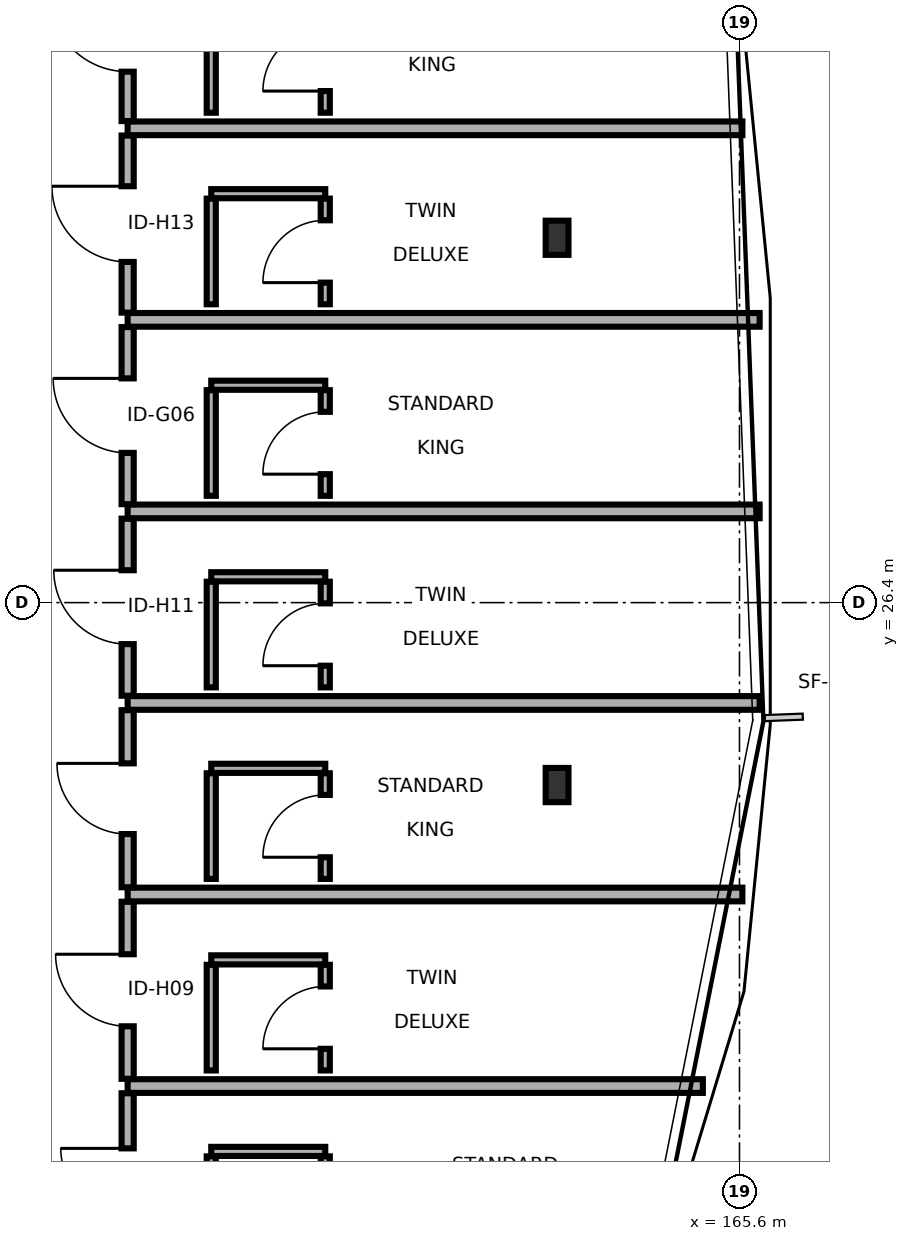
"""IFC4 building model, lengths in metres.
Left out: names, types, materials, properties, quantities, classifications, styles, units other than length and angle.
Written with IfcOpenShell. Run it as: python <this file> out.ifc"""

import sys

from ifc_helpers import new_model, si_unit, direction, frame, frame_2d, origin, origin_2d, place, context, subcontext, project, spatial, rectangle, i_section, extrude, element, fill, save


model = new_model("IFC4")
c1 = context("Model", 3, precision=1e-05, world=origin(), true_north=direction((0.0, 1.0)))
c2 = subcontext(c1, "Body", "Model", "MODEL_VIEW")
j1 = project(units=[si_unit("LENGTHUNIT", "METRE"), si_unit("PLANEANGLEUNIT", "RADIAN")], contexts=[c1])
p1 = place(None, origin())
s1 = spatial("IfcSite", under=j1, at=p1, CompositionType="ELEMENT")
p2 = place(p1, origin())
s2 = spatial("IfcBuilding", under=s1, at=p2, CompositionType="ELEMENT")
p3 = place(p2, frame((0.0, 0.0, 31.7)))
s3 = spatial("IfcBuildingStorey", under=s2, at=p3, CompositionType="ELEMENT", Elevation=31.7)
for number, where, z_axis, x_axis in (
    (1, (163.2, 24.0, 0.0), (0.0, 0.0, 1.0), (1.0, 0.0, 0.0)),
    (2, (163.2, 31.2, 0.0), (0.0, 0.0, 1.0), (1.0, 0.0, 0.0)),
):
    element("IfcColumn", number, at=place(p3, frame(where, z_axis=z_axis, x_axis=x_axis)), inside=s3, PredefinedType="COLUMN", context=c2, shape_type="SweptSolid", body=[
        extrude(i_section(OverallWidth=0.3, OverallDepth=0.45, WebThickness=0.014, FlangeThickness=0.026, FilletRadius=0.027, at=origin_2d()), origin(), (0.0, 0.0, 1.0), 3.4),
    ])
p4 = place(p3, frame((157.55, 17.615, 0.0), z_axis=(0.0, 0.0, 1.0), x_axis=(0.0, 1.0, 0.0)))
e3 = element("IfcWall", 3, at=p4, inside=s3, PredefinedType="PARTITIONING", context=c2, shape_type="SweptSolid", body=[
    extrude(rectangle(XDim=2.33, YDim=0.16, at=frame_2d((1.165, 0.0))), origin(), (0.0, 0.0, 1.0), 3.17),
])
p5 = place(p4, frame((0.725, 0.0, 0.0)))
e4 = element("IfcOpeningElement", 4, at=p5, cuts=e3, PredefinedType="OPENING", context=c2, shape_type="SweptSolid", body=[
    extrude(rectangle(XDim=0.88, YDim=2.05, at=frame_2d((0.44, 1.025))), frame((0.0, 0.09, 0.0), z_axis=(0.0, -1.0, 0.0), x_axis=(1.0, 0.0, 0.0)), (0.0, 0.0, 1.0), 0.18),
])
p6 = place(p3, frame((158.65, 19.18, 0.0), z_axis=(0.0, 0.0, 1.0), x_axis=(1.0, 0.0, 0.0)))
e5 = element("IfcWall", 5, at=p6, inside=s3, PredefinedType="PARTITIONING", context=c2, shape_type="SweptSolid", body=[
    extrude(rectangle(XDim=1.5, YDim=0.12, at=frame_2d((0.75, 0.0))), origin(), (0.0, 0.0, 1.0), 3.17),
])
p7 = place(p3, frame((158.65, 17.725, 0.0), z_axis=(0.0, 0.0, 1.0), x_axis=(0.0, 1.0, 0.0)))
e6 = element("IfcWall", 6, at=p7, inside=s3, PredefinedType="PARTITIONING", context=c2, shape_type="SweptSolid", body=[
    extrude(rectangle(XDim=1.39, YDim=0.12, at=frame_2d((0.695, 0.0))), origin(), (0.0, 0.0, 1.0), 3.17),
])
p8 = place(p3, frame((160.15, 17.725, 0.0), z_axis=(0.0, 0.0, 1.0), x_axis=(0.0, 1.0, 0.0)))
e7 = element("IfcWall", 7, at=p8, inside=s3, PredefinedType="PARTITIONING", context=c2, shape_type="SweptSolid", body=[
    extrude(rectangle(XDim=1.39, YDim=0.12, at=frame_2d((0.695, 0.0))), origin(), (0.0, 0.0, 1.0), 3.17),
])
p9 = place(p8, frame((0.285, 0.0, 0.0)))
e8 = element("IfcOpeningElement", 8, at=p9, cuts=e7, PredefinedType="OPENING", context=c2, shape_type="SweptSolid", body=[
    extrude(rectangle(XDim=0.82, YDim=2.08, at=frame_2d((0.41, 1.04))), frame((0.0, 0.07, 0.0), z_axis=(0.0, -1.0, 0.0), x_axis=(1.0, 0.0, 0.0)), (0.0, 0.0, 1.0), 0.14),
])
p10 = place(p3, frame((157.55, 20.04, 0.0), z_axis=(0.0, 0.0, 1.0), x_axis=(1.0, 0.0, 0.0)))
e9 = element("IfcWall", 9, at=p10, inside=s3, PredefinedType="PARTITIONING", context=c2, shape_type="SweptSolid", body=[
    extrude(rectangle(XDim=7.568, YDim=0.18, at=frame_2d((3.784, 0.0))), origin(), (0.0, 0.0, 1.0), 2.655),
])
p11 = place(p3, frame((157.55, 20.135, 0.0), z_axis=(0.0, 0.0, 1.0), x_axis=(0.0, 1.0, 0.0)))
e10 = element("IfcWall", 10, at=p11, inside=s3, PredefinedType="PARTITIONING", context=c2, shape_type="SweptSolid", body=[
    extrude(rectangle(XDim=2.33, YDim=0.16, at=frame_2d((1.165, 0.0))), origin(), (0.0, 0.0, 1.0), 3.17),
])
p12 = place(p11, frame((0.691, 0.0, 0.0)))
e11 = element("IfcOpeningElement", 11, at=p12, cuts=e10, PredefinedType="OPENING", context=c2, shape_type="SweptSolid", body=[
    extrude(rectangle(XDim=0.948, YDim=2.1, at=frame_2d((0.474, 1.05))), frame((0.0, 0.09, 0.0), z_axis=(0.0, -1.0, 0.0), x_axis=(1.0, 0.0, 0.0)), (0.0, 0.0, 1.0), 0.18),
])
p13 = place(p3, frame((158.65, 21.7, 0.0), z_axis=(0.0, 0.0, 1.0), x_axis=(1.0, 0.0, 0.0)))
e12 = element("IfcWall", 12, at=p13, inside=s3, PredefinedType="PARTITIONING", context=c2, shape_type="SweptSolid", body=[
    extrude(rectangle(XDim=1.5, YDim=0.12, at=frame_2d((0.75, 0.0))), origin(), (0.0, 0.0, 1.0), 3.17),
])
p14 = place(p3, frame((158.65, 20.245, 0.0), z_axis=(0.0, 0.0, 1.0), x_axis=(0.0, 1.0, 0.0)))
e13 = element("IfcWall", 13, at=p14, inside=s3, PredefinedType="PARTITIONING", context=c2, shape_type="SweptSolid", body=[
    extrude(rectangle(XDim=1.39, YDim=0.12, at=frame_2d((0.695, 0.0))), origin(), (0.0, 0.0, 1.0), 3.17),
])
p15 = place(p3, frame((160.15, 20.245, 0.0), z_axis=(0.0, 0.0, 1.0), x_axis=(0.0, 1.0, 0.0)))
e14 = element("IfcWall", 14, at=p15, inside=s3, PredefinedType="PARTITIONING", context=c2, shape_type="SweptSolid", body=[
    extrude(rectangle(XDim=1.39, YDim=0.12, at=frame_2d((0.695, 0.0))), origin(), (0.0, 0.0, 1.0), 3.17),
])
p16 = place(p15, frame((0.285, 0.0, 0.0)))
e15 = element("IfcOpeningElement", 15, at=p16, cuts=e14, PredefinedType="OPENING", context=c2, shape_type="SweptSolid", body=[
    extrude(rectangle(XDim=0.82, YDim=2.08, at=frame_2d((0.41, 1.04))), frame((0.0, 0.07, 0.0), z_axis=(0.0, -1.0, 0.0), x_axis=(1.0, 0.0, 0.0)), (0.0, 0.0, 1.0), 0.14),
])
p17 = place(p3, frame((157.55, 22.56, 0.0), z_axis=(0.0, 0.0, 1.0), x_axis=(1.0, 0.0, 0.0)))
e16 = element("IfcWall", 16, at=p17, inside=s3, PredefinedType="PARTITIONING", context=c2, shape_type="SweptSolid", body=[
    extrude(rectangle(XDim=8.088, YDim=0.18, at=frame_2d((4.044, 0.0))), origin(), (0.0, 0.0, 1.0), 2.655),
])
p18 = place(p3, frame((157.55, 22.655, 0.0), z_axis=(0.0, 0.0, 1.0), x_axis=(0.0, 1.0, 0.0)))
e17 = element("IfcWall", 17, at=p18, inside=s3, PredefinedType="PARTITIONING", context=c2, shape_type="SweptSolid", body=[
    extrude(rectangle(XDim=2.33, YDim=0.16, at=frame_2d((1.165, 0.0))), origin(), (0.0, 0.0, 1.0), 2.755),
])
p19 = place(p18, frame((0.7, 0.0, 0.0)))
e18 = element("IfcOpeningElement", 18, at=p19, cuts=e17, PredefinedType="OPENING", context=c2, shape_type="SweptSolid", body=[
    extrude(rectangle(XDim=0.93, YDim=2.05, at=frame_2d((0.465, 1.025))), frame((0.0, 0.09, 0.0), z_axis=(0.0, -1.0, 0.0), x_axis=(1.0, 0.0, 0.0)), (0.0, 0.0, 1.0), 0.18),
])
p20 = place(p3, frame((158.65, 24.22, 0.0), z_axis=(0.0, 0.0, 1.0), x_axis=(1.0, 0.0, 0.0)))
e19 = element("IfcWall", 19, at=p20, inside=s3, PredefinedType="PARTITIONING", context=c2, shape_type="SweptSolid", body=[
    extrude(rectangle(XDim=1.5, YDim=0.12, at=frame_2d((0.75, 0.0))), origin(), (0.0, 0.0, 1.0), 2.755),
])
p21 = place(p3, frame((158.65, 22.765, 0.0), z_axis=(0.0, 0.0, 1.0), x_axis=(0.0, 1.0, 0.0)))
e20 = element("IfcWall", 20, at=p21, inside=s3, PredefinedType="PARTITIONING", context=c2, shape_type="SweptSolid", body=[
    extrude(rectangle(XDim=1.39, YDim=0.12, at=frame_2d((0.695, 0.0))), origin(), (0.0, 0.0, 1.0), 2.755),
])
p22 = place(p3, frame((160.15, 22.765, 0.0), z_axis=(0.0, 0.0, 1.0), x_axis=(0.0, 1.0, 0.0)))
e21 = element("IfcWall", 21, at=p22, inside=s3, PredefinedType="PARTITIONING", context=c2, shape_type="SweptSolid", body=[
    extrude(rectangle(XDim=1.39, YDim=0.12, at=frame_2d((0.695, 0.0))), origin(), (0.0, 0.0, 1.0), 2.755),
])
p23 = place(p22, frame((0.285, 0.0, 0.0)))
e22 = element("IfcOpeningElement", 22, at=p23, cuts=e21, PredefinedType="OPENING", context=c2, shape_type="SweptSolid", body=[
    extrude(rectangle(XDim=0.82, YDim=2.08, at=frame_2d((0.41, 1.04))), frame((0.0, 0.07, 0.0), z_axis=(0.0, -1.0, 0.0), x_axis=(1.0, 0.0, 0.0)), (0.0, 0.0, 1.0), 0.14),
])
p24 = place(p3, frame((157.55, 25.08, 0.0), z_axis=(0.0, 0.0, 1.0), x_axis=(1.0, 0.0, 0.0)))
e23 = element("IfcWall", 23, at=p24, inside=s3, PredefinedType="PARTITIONING", context=c2, shape_type="SweptSolid", body=[
    extrude(rectangle(XDim=8.315, YDim=0.18, at=frame_2d((4.157, 0.0))), origin(), (0.0, 0.0, 1.0), 2.655),
])
p25 = place(p3, frame((157.55, 25.175, 0.0), z_axis=(0.0, 0.0, 1.0), x_axis=(0.0, 1.0, 0.0)))
e24 = element("IfcWall", 24, at=p25, inside=s3, PredefinedType="PARTITIONING", context=c2, shape_type="SweptSolid", body=[
    extrude(rectangle(XDim=2.33, YDim=0.16, at=frame_2d((1.165, 0.0))), origin(), (0.0, 0.0, 1.0), 3.17),
])
p26 = place(p25, frame((0.679, 0.0, 0.0)))
e25 = element("IfcOpeningElement", 25, at=p26, cuts=e24, PredefinedType="OPENING", context=c2, shape_type="SweptSolid", body=[
    extrude(rectangle(XDim=0.972, YDim=2.16, at=frame_2d((0.486, 1.08))), frame((0.0, 0.09, 0.0), z_axis=(0.0, -1.0, 0.0), x_axis=(1.0, 0.0, 0.0)), (0.0, 0.0, 1.0), 0.18),
])
p27 = place(p3, frame((158.65, 26.74, 0.0), z_axis=(0.0, 0.0, 1.0), x_axis=(1.0, 0.0, 0.0)))
e26 = element("IfcWall", 26, at=p27, inside=s3, PredefinedType="PARTITIONING", context=c2, shape_type="SweptSolid", body=[
    extrude(rectangle(XDim=1.5, YDim=0.12, at=frame_2d((0.75, 0.0))), origin(), (0.0, 0.0, 1.0), 3.17),
])
p28 = place(p3, frame((158.65, 25.285, 0.0), z_axis=(0.0, 0.0, 1.0), x_axis=(0.0, 1.0, 0.0)))
e27 = element("IfcWall", 27, at=p28, inside=s3, PredefinedType="PARTITIONING", context=c2, shape_type="SweptSolid", body=[
    extrude(rectangle(XDim=1.39, YDim=0.12, at=frame_2d((0.695, 0.0))), origin(), (0.0, 0.0, 1.0), 3.17),
])
p29 = place(p3, frame((160.15, 25.285, 0.0), z_axis=(0.0, 0.0, 1.0), x_axis=(0.0, 1.0, 0.0)))
e28 = element("IfcWall", 28, at=p29, inside=s3, PredefinedType="PARTITIONING", context=c2, shape_type="SweptSolid", body=[
    extrude(rectangle(XDim=1.39, YDim=0.12, at=frame_2d((0.695, 0.0))), origin(), (0.0, 0.0, 1.0), 3.17),
])
p30 = place(p29, frame((0.285, 0.0, 0.0)))
e29 = element("IfcOpeningElement", 29, at=p30, cuts=e28, PredefinedType="OPENING", context=c2, shape_type="SweptSolid", body=[
    extrude(rectangle(XDim=0.82, YDim=2.08, at=frame_2d((0.41, 1.04))), frame((0.0, 0.07, 0.0), z_axis=(0.0, -1.0, 0.0), x_axis=(1.0, 0.0, 0.0)), (0.0, 0.0, 1.0), 0.14),
])
p31 = place(p3, frame((157.55, 27.6, 0.0), z_axis=(0.0, 0.0, 1.0), x_axis=(1.0, 0.0, 0.0)))
e30 = element("IfcWall", 30, at=p31, inside=s3, PredefinedType="PARTITIONING", context=c2, shape_type="SweptSolid", body=[
    extrude(rectangle(XDim=8.315, YDim=0.18, at=frame_2d((4.157, 0.0))), origin(), (0.0, 0.0, 1.0), 2.655),
])
p32 = place(p3, frame((157.55, 27.695, 0.0), z_axis=(0.0, 0.0, 1.0), x_axis=(0.0, 1.0, 0.0)))
e31 = element("IfcWall", 31, at=p32, inside=s3, PredefinedType="PARTITIONING", context=c2, shape_type="SweptSolid", body=[
    extrude(rectangle(XDim=2.33, YDim=0.16, at=frame_2d((1.165, 0.0))), origin(), (0.0, 0.0, 1.0), 3.17),
])
p33 = place(p32, frame((0.675, 0.0, 0.0)))
e32 = element("IfcOpeningElement", 32, at=p33, cuts=e31, PredefinedType="OPENING", context=c2, shape_type="SweptSolid", body=[
    extrude(rectangle(XDim=0.98, YDim=2.05, at=frame_2d((0.49, 1.025))), frame((0.0, 0.09, 0.0), z_axis=(0.0, -1.0, 0.0), x_axis=(1.0, 0.0, 0.0)), (0.0, 0.0, 1.0), 0.18),
])
p34 = place(p3, frame((158.65, 29.26, 0.0), z_axis=(0.0, 0.0, 1.0), x_axis=(1.0, 0.0, 0.0)))
e33 = element("IfcWall", 33, at=p34, inside=s3, PredefinedType="PARTITIONING", context=c2, shape_type="SweptSolid", body=[
    extrude(rectangle(XDim=1.5, YDim=0.12, at=frame_2d((0.75, 0.0))), origin(), (0.0, 0.0, 1.0), 3.17),
])
p35 = place(p3, frame((158.65, 27.805, 0.0), z_axis=(0.0, 0.0, 1.0), x_axis=(0.0, 1.0, 0.0)))
e34 = element("IfcWall", 34, at=p35, inside=s3, PredefinedType="PARTITIONING", context=c2, shape_type="SweptSolid", body=[
    extrude(rectangle(XDim=1.39, YDim=0.12, at=frame_2d((0.695, 0.0))), origin(), (0.0, 0.0, 1.0), 3.17),
])
p36 = place(p3, frame((160.15, 27.805, 0.0), z_axis=(0.0, 0.0, 1.0), x_axis=(0.0, 1.0, 0.0)))
e35 = element("IfcWall", 35, at=p36, inside=s3, PredefinedType="PARTITIONING", context=c2, shape_type="SweptSolid", body=[
    extrude(rectangle(XDim=1.39, YDim=0.12, at=frame_2d((0.695, 0.0))), origin(), (0.0, 0.0, 1.0), 3.17),
])
p37 = place(p36, frame((0.285, 0.0, 0.0)))
e36 = element("IfcOpeningElement", 36, at=p37, cuts=e35, PredefinedType="OPENING", context=c2, shape_type="SweptSolid", body=[
    extrude(rectangle(XDim=0.82, YDim=2.08, at=frame_2d((0.41, 1.04))), frame((0.0, 0.07, 0.0), z_axis=(0.0, -1.0, 0.0), x_axis=(1.0, 0.0, 0.0)), (0.0, 0.0, 1.0), 0.14),
])
p38 = place(p3, frame((157.55, 30.12, 0.0), z_axis=(0.0, 0.0, 1.0), x_axis=(1.0, 0.0, 0.0)))
e37 = element("IfcWall", 37, at=p38, inside=s3, PredefinedType="PARTITIONING", context=c2, shape_type="SweptSolid", body=[
    extrude(rectangle(XDim=8.315, YDim=0.18, at=frame_2d((4.157, 0.0))), origin(), (0.0, 0.0, 1.0), 2.655),
])
p39 = place(p3, frame((157.55, 30.215, 0.0), z_axis=(0.0, 0.0, 1.0), x_axis=(0.0, 1.0, 0.0)))
e38 = element("IfcWall", 38, at=p39, inside=s3, PredefinedType="PARTITIONING", context=c2, shape_type="SweptSolid", body=[
    extrude(rectangle(XDim=2.33, YDim=0.16, at=frame_2d((1.165, 0.0))), origin(), (0.0, 0.0, 1.0), 2.755),
])
p40 = place(p39, frame((0.667, 0.0, 0.0)))
e39 = element("IfcOpeningElement", 39, at=p40, cuts=e38, PredefinedType="OPENING", context=c2, shape_type="SweptSolid", body=[
    extrude(rectangle(XDim=0.996, YDim=2.1, at=frame_2d((0.498, 1.05))), frame((0.0, 0.09, 0.0), z_axis=(0.0, -1.0, 0.0), x_axis=(1.0, 0.0, 0.0)), (0.0, 0.0, 1.0), 0.18),
])
p41 = place(p3, frame((158.65, 31.78, 0.0), z_axis=(0.0, 0.0, 1.0), x_axis=(1.0, 0.0, 0.0)))
e40 = element("IfcWall", 40, at=p41, inside=s3, PredefinedType="PARTITIONING", context=c2, shape_type="SweptSolid", body=[
    extrude(rectangle(XDim=1.5, YDim=0.12, at=frame_2d((0.75, 0.0))), origin(), (0.0, 0.0, 1.0), 3.17),
])
p42 = place(p3, frame((158.65, 30.325, 0.0), z_axis=(0.0, 0.0, 1.0), x_axis=(0.0, 1.0, 0.0)))
e41 = element("IfcWall", 41, at=p42, inside=s3, PredefinedType="PARTITIONING", context=c2, shape_type="SweptSolid", body=[
    extrude(rectangle(XDim=1.39, YDim=0.12, at=frame_2d((0.695, 0.0))), origin(), (0.0, 0.0, 1.0), 2.755),
])
p43 = place(p3, frame((160.15, 30.325, 0.0), z_axis=(0.0, 0.0, 1.0), x_axis=(0.0, 1.0, 0.0)))
e42 = element("IfcWall", 42, at=p43, inside=s3, PredefinedType="PARTITIONING", context=c2, shape_type="SweptSolid", body=[
    extrude(rectangle(XDim=1.39, YDim=0.12, at=frame_2d((0.695, 0.0))), origin(), (0.0, 0.0, 1.0), 2.755),
])
p44 = place(p43, frame((0.285, 0.0, 0.0)))
e43 = element("IfcOpeningElement", 43, at=p44, cuts=e42, PredefinedType="OPENING", context=c2, shape_type="SweptSolid", body=[
    extrude(rectangle(XDim=0.82, YDim=2.08, at=frame_2d((0.41, 1.04))), frame((0.0, 0.07, 0.0), z_axis=(0.0, -1.0, 0.0), x_axis=(1.0, 0.0, 0.0)), (0.0, 0.0, 1.0), 0.14),
])
p45 = place(p3, frame((157.55, 32.64, 0.0), z_axis=(0.0, 0.0, 1.0), x_axis=(1.0, 0.0, 0.0)))
e44 = element("IfcWall", 44, at=p45, inside=s3, PredefinedType="PARTITIONING", context=c2, shape_type="SweptSolid", body=[
    extrude(rectangle(XDim=8.088, YDim=0.18, at=frame_2d((4.044, 0.0))), origin(), (0.0, 0.0, 1.0), 2.655),
])
p46 = place(p3, frame((157.55, 32.735, 0.0), z_axis=(0.0, 0.0, 1.0), x_axis=(0.0, 1.0, 0.0)))
e45 = element("IfcWall", 45, at=p46, inside=s3, PredefinedType="PARTITIONING", context=c2, shape_type="SweptSolid", body=[
    extrude(rectangle(XDim=2.33, YDim=0.16, at=frame_2d((1.165, 0.0))), origin(), (0.0, 0.0, 1.0), 3.17),
])
p47 = place(p46, frame((0.65, 0.0, 0.0)))
e46 = element("IfcOpeningElement", 46, at=p47, cuts=e45, PredefinedType="OPENING", context=c2, shape_type="SweptSolid", body=[
    extrude(rectangle(XDim=1.03, YDim=2.05, at=frame_2d((0.515, 1.025))), frame((0.0, 0.09, 0.0), z_axis=(0.0, -1.0, 0.0), x_axis=(1.0, 0.0, 0.0)), (0.0, 0.0, 1.0), 0.18),
])
p48 = place(p3, frame((158.65, 32.845, 0.0), z_axis=(0.0, 0.0, 1.0), x_axis=(0.0, 1.0, 0.0)))
e47 = element("IfcWall", 47, at=p48, inside=s3, PredefinedType="PARTITIONING", context=c2, shape_type="SweptSolid", body=[
    extrude(rectangle(XDim=1.39, YDim=0.12, at=frame_2d((0.695, 0.0))), origin(), (0.0, 0.0, 1.0), 3.17),
])
p49 = place(p3, frame((160.15, 32.845, 0.0), z_axis=(0.0, 0.0, 1.0), x_axis=(0.0, 1.0, 0.0)))
e48 = element("IfcWall", 48, at=p49, inside=s3, PredefinedType="PARTITIONING", context=c2, shape_type="SweptSolid", body=[
    extrude(rectangle(XDim=1.39, YDim=0.12, at=frame_2d((0.695, 0.0))), origin(), (0.0, 0.0, 1.0), 3.17),
])
p50 = place(p49, frame((0.285, 0.0, 0.0)))
e49 = element("IfcOpeningElement", 49, at=p50, cuts=e48, PredefinedType="OPENING", context=c2, shape_type="SweptSolid", body=[
    extrude(rectangle(XDim=0.82, YDim=2.08, at=frame_2d((0.41, 1.04))), frame((0.0, 0.07, 0.0), z_axis=(0.0, -1.0, 0.0), x_axis=(1.0, 0.0, 0.0)), (0.0, 0.0, 1.0), 0.14),
])
p51 = place(p5, origin())
e50 = element("IfcDoor", 50, at=p51, inside=s3, OperationType="SINGLE_SWING_RIGHT", PredefinedType="DOOR", context=c2, shape_type="SweptSolid", body=[
    extrude(rectangle(XDim=0.88, YDim=2.05, at=frame_2d((0.44, 1.025))), frame((0.0, 0.025, 0.0), z_axis=(0.0, -1.0, 0.0), x_axis=(1.0, 0.0, 0.0)), (0.0, 0.0, 1.0), 0.05),
])
fill(e4, e50)
p52 = place(p12, origin())
e51 = element("IfcDoor", 51, at=p52, inside=s3, OperationType="SINGLE_SWING_RIGHT", PredefinedType="DOOR", context=c2, shape_type="SweptSolid", body=[
    extrude(rectangle(XDim=0.948, YDim=2.1, at=frame_2d((0.474, 1.05))), frame((0.0, 0.025, 0.0), z_axis=(0.0, -1.0, 0.0), x_axis=(1.0, 0.0, 0.0)), (0.0, 0.0, 1.0), 0.05),
])
fill(e11, e51)
p53 = place(p16, origin())
e52 = element("IfcDoor", 52, at=p53, inside=s3, OperationType="SINGLE_SWING_LEFT", PredefinedType="DOOR", context=c2, shape_type="SweptSolid", body=[
    extrude(rectangle(XDim=0.82, YDim=2.08, at=frame_2d((0.41, 1.04))), frame((0.0, 0.025, 0.0), z_axis=(0.0, -1.0, 0.0), x_axis=(1.0, 0.0, 0.0)), (0.0, 0.0, 1.0), 0.05),
])
fill(e15, e52)
p54 = place(p19, origin())
e53 = element("IfcDoor", 53, at=p54, inside=s3, OperationType="SINGLE_SWING_RIGHT", PredefinedType="DOOR", context=c2, shape_type="SweptSolid", body=[
    extrude(rectangle(XDim=0.93, YDim=2.05, at=frame_2d((0.465, 1.025))), frame((0.0, 0.025, 0.0), z_axis=(0.0, -1.0, 0.0), x_axis=(1.0, 0.0, 0.0)), (0.0, 0.0, 1.0), 0.05),
])
fill(e18, e53)
p55 = place(p23, origin())
e54 = element("IfcDoor", 54, at=p55, inside=s3, OperationType="SINGLE_SWING_LEFT", PredefinedType="DOOR", context=c2, shape_type="SweptSolid", body=[
    extrude(rectangle(XDim=0.82, YDim=2.08, at=frame_2d((0.41, 1.04))), frame((0.0, 0.025, 0.0), z_axis=(0.0, -1.0, 0.0), x_axis=(1.0, 0.0, 0.0)), (0.0, 0.0, 1.0), 0.05),
])
fill(e22, e54)
p56 = place(p26, origin())
e55 = element("IfcDoor", 55, at=p56, inside=s3, OperationType="SINGLE_SWING_RIGHT", PredefinedType="DOOR", context=c2, shape_type="SweptSolid", body=[
    extrude(rectangle(XDim=0.972, YDim=2.16, at=frame_2d((0.486, 1.08))), frame((0.0, 0.025, 0.0), z_axis=(0.0, -1.0, 0.0), x_axis=(1.0, 0.0, 0.0)), (0.0, 0.0, 1.0), 0.05),
])
fill(e25, e55)
p57 = place(p30, origin())
e56 = element("IfcDoor", 56, at=p57, inside=s3, OperationType="SINGLE_SWING_LEFT", PredefinedType="DOOR", context=c2, shape_type="SweptSolid", body=[
    extrude(rectangle(XDim=0.82, YDim=2.08, at=frame_2d((0.41, 1.04))), frame((0.0, 0.025, 0.0), z_axis=(0.0, -1.0, 0.0), x_axis=(1.0, 0.0, 0.0)), (0.0, 0.0, 1.0), 0.05),
])
fill(e29, e56)
p58 = place(p33, origin())
e57 = element("IfcDoor", 57, at=p58, inside=s3, OperationType="SINGLE_SWING_RIGHT", PredefinedType="DOOR", context=c2, shape_type="SweptSolid", body=[
    extrude(rectangle(XDim=0.98, YDim=2.05, at=frame_2d((0.49, 1.025))), frame((0.0, 0.025, 0.0), z_axis=(0.0, -1.0, 0.0), x_axis=(1.0, 0.0, 0.0)), (0.0, 0.0, 1.0), 0.05),
])
fill(e32, e57)
p59 = place(p37, origin())
e58 = element("IfcDoor", 58, at=p59, inside=s3, OperationType="SINGLE_SWING_LEFT", PredefinedType="DOOR", context=c2, shape_type="SweptSolid", body=[
    extrude(rectangle(XDim=0.82, YDim=2.08, at=frame_2d((0.41, 1.04))), frame((0.0, 0.025, 0.0), z_axis=(0.0, -1.0, 0.0), x_axis=(1.0, 0.0, 0.0)), (0.0, 0.0, 1.0), 0.05),
])
fill(e36, e58)
p60 = place(p40, origin())
e59 = element("IfcDoor", 59, at=p60, inside=s3, OperationType="SINGLE_SWING_RIGHT", PredefinedType="DOOR", context=c2, shape_type="SweptSolid", body=[
    extrude(rectangle(XDim=0.996, YDim=2.1, at=frame_2d((0.498, 1.05))), frame((0.0, 0.025, 0.0), z_axis=(0.0, -1.0, 0.0), x_axis=(1.0, 0.0, 0.0)), (0.0, 0.0, 1.0), 0.05),
])
fill(e39, e59)
p61 = place(p44, origin())
e60 = element("IfcDoor", 60, at=p61, inside=s3, OperationType="SINGLE_SWING_LEFT", PredefinedType="DOOR", context=c2, shape_type="SweptSolid", body=[
    extrude(rectangle(XDim=0.82, YDim=2.08, at=frame_2d((0.41, 1.04))), frame((0.0, 0.025, 0.0), z_axis=(0.0, -1.0, 0.0), x_axis=(1.0, 0.0, 0.0)), (0.0, 0.0, 1.0), 0.05),
])
fill(e43, e60)
p62 = place(p47, origin())
e61 = element("IfcDoor", 61, at=p62, inside=s3, OperationType="SINGLE_SWING_RIGHT", PredefinedType="DOOR", context=c2, shape_type="SweptSolid", body=[
    extrude(rectangle(XDim=1.03, YDim=2.05, at=frame_2d((0.515, 1.025))), frame((0.0, 0.025, 0.0), z_axis=(0.0, -1.0, 0.0), x_axis=(1.0, 0.0, 0.0)), (0.0, 0.0, 1.0), 0.05),
])
fill(e46, e61)
p63 = place(p50, origin())
e62 = element("IfcDoor", 62, at=p63, inside=s3, OperationType="SINGLE_SWING_LEFT", PredefinedType="DOOR", context=c2, shape_type="SweptSolid", body=[
    extrude(rectangle(XDim=0.82, YDim=2.08, at=frame_2d((0.41, 1.04))), frame((0.0, 0.025, 0.0), z_axis=(0.0, -1.0, 0.0), x_axis=(1.0, 0.0, 0.0)), (0.0, 0.0, 1.0), 0.05),
])
fill(e49, e62)
save(model, sys.argv[1])
